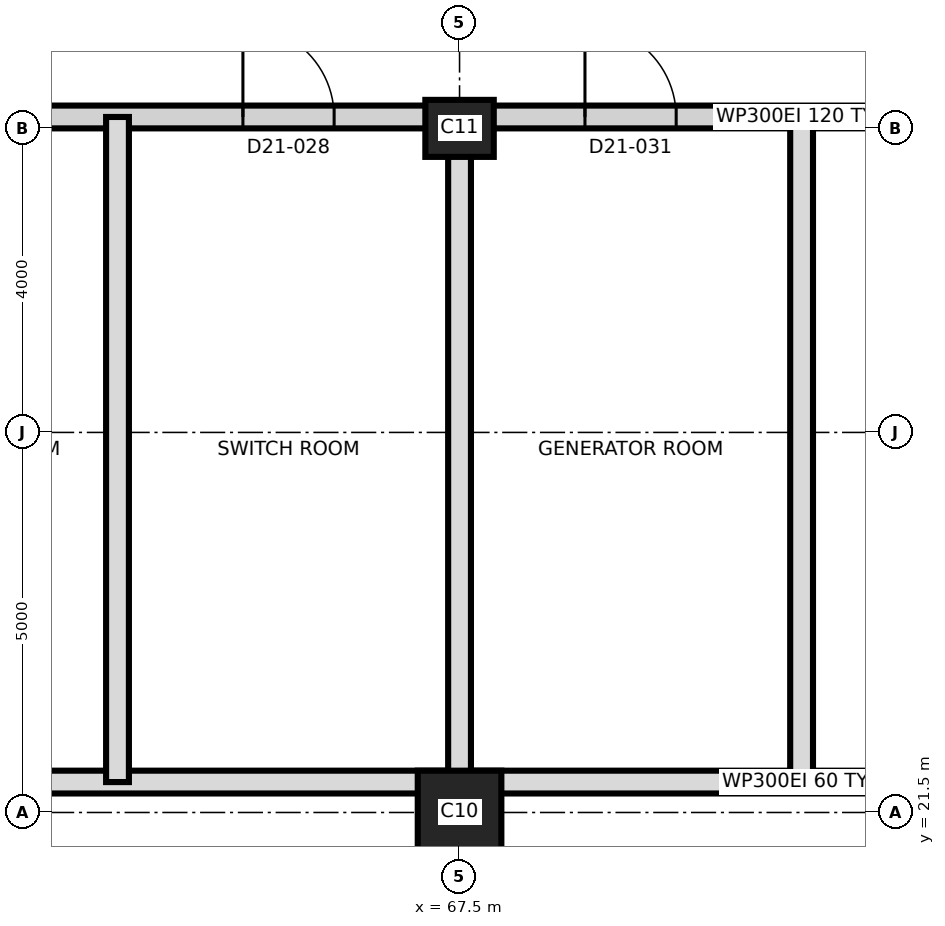
"""IFC4 building model, lengths in metres.
Left out: names, types, materials, properties, quantities, classifications, styles, units other than length and angle.
Written with IfcOpenShell. Run it as: python <this file> out.ifc"""

import sys

from ifc_helpers import new_model, si_unit, direction, frame, frame_2d, origin, origin_2d, place, context, subcontext, project, spatial, rectangle, extrude, element, fill, save


model = new_model("IFC4")
c1 = context("Model", 3, precision=1e-05, world=origin(), true_north=direction((0.0, 1.0)))
c2 = subcontext(c1, "Body", "Model", "MODEL_VIEW")
j1 = project(units=[si_unit("LENGTHUNIT", "METRE"), si_unit("PLANEANGLEUNIT", "RADIAN")], contexts=[c1])
p1 = place(None, origin())
s1 = spatial("IfcSite", under=j1, at=p1, CompositionType="ELEMENT")
p2 = place(p1, origin())
s2 = spatial("IfcBuilding", under=s1, at=p2, CompositionType="ELEMENT")
p3 = place(p2, frame((0.0, 0.0, 190.3)))
s3 = spatial("IfcBuildingStorey", under=s2, at=p3, CompositionType="ELEMENT", Elevation=190.3)
p4 = place(p3, frame((67.5, 21.5, 0.0), z_axis=(0.0, 0.0, 1.0), x_axis=(1.0, 0.0, 0.0)))
e1 = element("IfcColumn", 1, at=p4, inside=s3, PredefinedType="COLUMN", context=c2, shape_type="SweptSolid", body=[
    extrude(rectangle(XDim=1.1, YDim=1.1, at=origin_2d()), origin(), (0.0, 0.0, 1.0), 5.5),
])
p5 = place(p3, frame((67.5, 30.5, 0.0), z_axis=(0.0, 0.0, 1.0), x_axis=(1.0, 0.0, 0.0)))
e2 = element("IfcColumn", 2, at=p5, inside=s3, PredefinedType="COLUMN", context=c2, shape_type="SweptSolid", body=[
    extrude(rectangle(XDim=0.9, YDim=0.75, at=origin_2d()), origin(), (0.0, 0.0, 1.0), 5.5),
])
p6 = place(p3, frame((58.65, 21.9, 0.0), z_axis=(0.0, 0.0, 1.0), x_axis=(1.0, 0.0, 0.0)))
e3 = element("IfcWall", 3, at=p6, inside=s3, PredefinedType="PARTITIONING", context=c2, shape_type="SweptSolid", body=[
    extrude(rectangle(XDim=26.68, YDim=0.3, at=frame_2d((13.34, 0.0))), origin(), (0.0, 0.0, 1.0), 5.2),
])
p7 = place(p3, frame((58.65, 30.65, 0.0), z_axis=(0.0, 0.0, 1.0), x_axis=(1.0, 0.0, 0.0)))
e4 = element("IfcWall", 4, at=p7, inside=s3, PredefinedType="PARTITIONING", context=c2, shape_type="SweptSolid", body=[
    extrude(rectangle(XDim=26.68, YDim=0.3, at=frame_2d((13.34, 0.0))), origin(), (0.0, 0.0, 1.0), 5.2),
])
p8 = place(p7, frame((1.5, 0.0, 0.0)))
e5 = element("IfcOpeningElement", 5, at=p8, cuts=e4, PredefinedType="OPENING", context=c2, shape_type="SweptSolid", body=[
    extrude(rectangle(XDim=1.2, YDim=2.1, at=frame_2d((0.6, 1.05))), frame((0.0, 0.16, 0.0), z_axis=(0.0, -1.0, 0.0), x_axis=(1.0, 0.0, 0.0)), (0.0, 0.0, 1.0), 0.32),
])
p9 = place(p7, frame((6.0, 0.0, 0.0)))
e6 = element("IfcOpeningElement", 6, at=p9, cuts=e4, PredefinedType="OPENING", context=c2, shape_type="SweptSolid", body=[
    extrude(rectangle(XDim=1.2, YDim=2.1, at=frame_2d((0.6, 1.05))), frame((0.0, 0.16, 0.0), z_axis=(0.0, -1.0, 0.0), x_axis=(1.0, 0.0, 0.0)), (0.0, 0.0, 1.0), 0.32),
])
p10 = place(p7, frame((10.5, 0.0, 0.0)))
e7 = element("IfcOpeningElement", 7, at=p10, cuts=e4, PredefinedType="OPENING", context=c2, shape_type="SweptSolid", body=[
    extrude(rectangle(XDim=1.2, YDim=2.1, at=frame_2d((0.6, 1.05))), frame((0.0, 0.16, 0.0), z_axis=(0.0, -1.0, 0.0), x_axis=(1.0, 0.0, 0.0)), (0.0, 0.0, 1.0), 0.32),
])
p11 = place(p7, frame((15.0, 0.0, 0.0)))
e8 = element("IfcOpeningElement", 8, at=p11, cuts=e4, PredefinedType="OPENING", context=c2, shape_type="SweptSolid", body=[
    extrude(rectangle(XDim=1.2, YDim=2.1, at=frame_2d((0.6, 1.05))), frame((0.0, 0.16, 0.0), z_axis=(0.0, -1.0, 0.0), x_axis=(1.0, 0.0, 0.0)), (0.0, 0.0, 1.0), 0.32),
])
p12 = place(p7, frame((19.5, 0.0, 0.0)))
e9 = element("IfcOpeningElement", 9, at=p12, cuts=e4, PredefinedType="OPENING", context=c2, shape_type="SweptSolid", body=[
    extrude(rectangle(XDim=1.2, YDim=2.1, at=frame_2d((0.6, 1.05))), frame((0.0, 0.16, 0.0), z_axis=(0.0, -1.0, 0.0), x_axis=(1.0, 0.0, 0.0)), (0.0, 0.0, 1.0), 0.32),
])
p13 = place(p7, frame((24.0, 0.0, 0.0)))
e10 = element("IfcOpeningElement", 10, at=p13, cuts=e4, PredefinedType="OPENING", context=c2, shape_type="SweptSolid", body=[
    extrude(rectangle(XDim=1.2, YDim=2.1, at=frame_2d((0.6, 1.05))), frame((0.0, 0.16, 0.0), z_axis=(0.0, -1.0, 0.0), x_axis=(1.0, 0.0, 0.0)), (0.0, 0.0, 1.0), 0.32),
])
for number, where, z_axis, x_axis in (
    (11, (63.0, 21.9, 0.0), (0.0, 0.0, 1.0), (0.0, 1.0, 0.0)),
    (12, (67.5, 21.9, 0.0), (0.0, 0.0, 1.0), (0.0, 1.0, 0.0)),
    (13, (72.0, 21.9, 0.0), (0.0, 0.0, 1.0), (0.0, 1.0, 0.0)),
):
    element("IfcWall", number, at=place(p3, frame(where, z_axis=z_axis, x_axis=x_axis)), inside=s3, PredefinedType="PARTITIONING", context=c2, shape_type="SweptSolid", body=[
        extrude(rectangle(XDim=8.75, YDim=0.3, at=frame_2d((4.375, 0.0))), origin(), (0.0, 0.0, 1.0), 5.2),
    ])
p14 = place(p9, origin())
e14 = element("IfcDoor", 14, at=p14, inside=s3, OperationType="SINGLE_SWING_LEFT", PredefinedType="DOOR", context=c2, shape_type="SweptSolid", body=[
    extrude(rectangle(XDim=1.2, YDim=2.1, at=frame_2d((0.6, 1.05))), frame((0.0, 0.025, 0.0), z_axis=(0.0, -1.0, 0.0), x_axis=(1.0, 0.0, 0.0)), (0.0, 0.0, 1.0), 0.05),
])
fill(e6, e14)
p15 = place(p10, origin())
e15 = element("IfcDoor", 15, at=p15, inside=s3, OperationType="SINGLE_SWING_LEFT", PredefinedType="DOOR", context=c2, shape_type="SweptSolid", body=[
    extrude(rectangle(XDim=1.2, YDim=2.1, at=frame_2d((0.6, 1.05))), frame((0.0, 0.025, 0.0), z_axis=(0.0, -1.0, 0.0), x_axis=(1.0, 0.0, 0.0)), (0.0, 0.0, 1.0), 0.05),
])
fill(e7, e15)
save(model, sys.argv[1])
